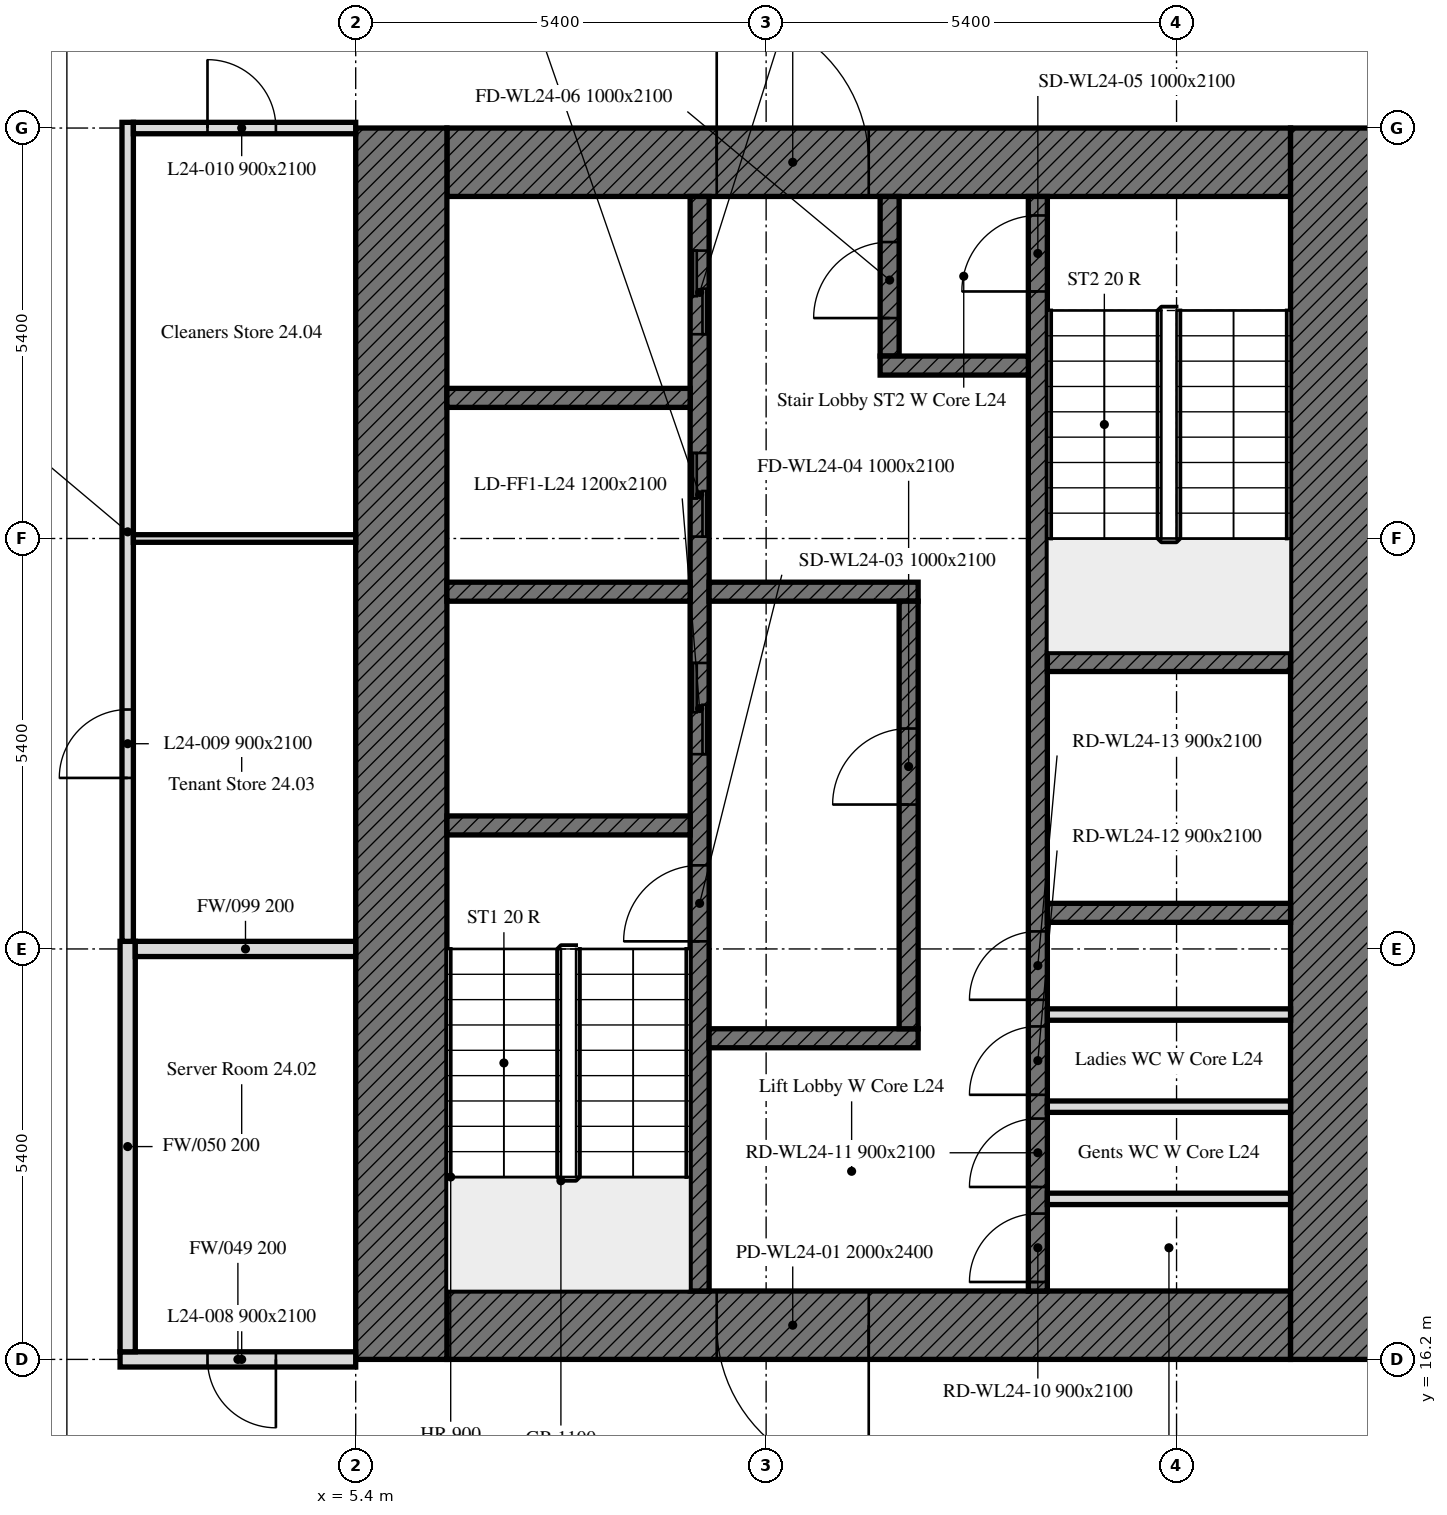
"""IFC4 building model, lengths in metres.
Left out: names, types, materials, properties, quantities, classifications, styles, units other than length and angle.
Written with IfcOpenShell. Run it as: python <this file> out.ifc"""

import sys

from ifc_helpers import new_model, si_unit, direction, frame, frame_2d, origin, place, context, subcontext, project, spatial, rectangle, extrude, element, fill, save


model = new_model("IFC4")
c1 = context("Model", 3, precision=1e-05, world=origin(), true_north=direction((0.0, 1.0)))
c2 = subcontext(c1, "Body", "Model", "MODEL_VIEW")
j1 = project(units=[si_unit("LENGTHUNIT", "METRE"), si_unit("PLANEANGLEUNIT", "RADIAN")], contexts=[c1])
p1 = place(None, origin())
s1 = spatial("IfcSite", under=j1, at=p1, CompositionType="ELEMENT")
p2 = place(p1, origin())
s2 = spatial("IfcBuilding", under=s1, at=p2, CompositionType="ELEMENT")
p3 = place(p2, frame((0.0, 0.0, 103.0)))
s3 = spatial("IfcBuildingStorey", under=s2, at=p3, CompositionType="ELEMENT", Elevation=103.0)
p4 = place(p3, frame((17.7, 16.65, 0.0), z_axis=(0.0, 0.0, 1.0), x_axis=(-1.0, 0.0, 0.0)))
e1 = element("IfcWall", 1, at=p4, inside=s3, PredefinedType="SOLIDWALL", context=c2, shape_type="SweptSolid", body=[
    extrude(rectangle(XDim=11.1, YDim=0.9, at=frame_2d((5.55, 0.0))), origin(), (0.0, 0.0, 1.0), 3.5),
])
p5 = place(p4, frame((5.55, 0.0, 0.0)))
e2 = element("IfcOpeningElement", 2, at=p5, cuts=e1, PredefinedType="OPENING", context=c2, shape_type="SweptSolid", body=[
    extrude(rectangle(XDim=2.0, YDim=2.4, at=frame_2d((1.0, 1.2))), frame((0.0, 0.45, 0.0), z_axis=(0.0, -1.0, 0.0), x_axis=(1.0, 0.0, 0.0)), (0.0, 0.0, 1.0), 0.9),
])
p6 = place(p3, frame((6.6, 31.95, 0.0), z_axis=(0.0, 0.0, 1.0), x_axis=(1.0, 0.0, 0.0)))
e3 = element("IfcWall", 3, at=p6, inside=s3, PredefinedType="SOLIDWALL", context=c2, shape_type="SweptSolid", body=[
    extrude(rectangle(XDim=11.1, YDim=0.9, at=frame_2d((5.55, 0.0))), origin(), (0.0, 0.0, 1.0), 3.5),
])
p7 = place(p6, frame((3.55, 0.0, 0.0)))
e4 = element("IfcOpeningElement", 4, at=p7, cuts=e3, PredefinedType="OPENING", context=c2, shape_type="SweptSolid", body=[
    extrude(rectangle(XDim=2.0, YDim=2.4, at=frame_2d((1.0, 1.2))), frame((0.0, 0.45, 0.0), z_axis=(0.0, -1.0, 0.0), x_axis=(1.0, 0.0, 0.0)), (0.0, 0.0, 1.0), 0.9),
])
for number, where, z_axis, x_axis in (
    (5, (6.0, 16.2, 0.0), (0.0, 0.0, 1.0), (0.0, 1.0, 0.0)),
    (6, (18.3, 32.4, 0.0), (0.0, 0.0, 1.0), (0.0, -1.0, 0.0)),
):
    element("IfcWall", number, at=place(p3, frame(where, z_axis=z_axis, x_axis=x_axis)), inside=s3, PredefinedType="SOLIDWALL", context=c2, shape_type="SweptSolid", body=[
        extrude(rectangle(XDim=16.2, YDim=1.2, at=frame_2d((8.1, 0.0))), origin(), (0.0, 0.0, 1.0), 3.5),
    ])
p8 = place(p3, frame((9.925, 17.1, 0.0), z_axis=(0.0, 0.0, 1.0), x_axis=(0.0, 1.0, 0.0)))
e7 = element("IfcWall", 7, at=p8, inside=s3, PredefinedType="SOLIDWALL", context=c2, shape_type="SweptSolid", body=[
    extrude(rectangle(XDim=14.4, YDim=0.25, at=frame_2d((7.2, 0.0))), origin(), (0.0, 0.0, 1.0), 3.5),
])
p9 = place(p8, frame((4.6, 0.0, 0.0)))
e8 = element("IfcOpeningElement", 8, at=p9, cuts=e7, PredefinedType="OPENING", context=c2, shape_type="SweptSolid", body=[
    extrude(rectangle(XDim=1.0, YDim=2.1, at=frame_2d((0.5, 1.05))), frame((0.0, 0.125, 0.0), z_axis=(0.0, -1.0, 0.0), x_axis=(1.0, 0.0, 0.0)), (0.0, 0.0, 1.0), 0.25),
])
p10 = place(p8, frame((7.062, 0.0, 0.0)))
e9 = element("IfcOpeningElement", 9, at=p10, cuts=e7, PredefinedType="OPENING", context=c2, shape_type="SweptSolid", body=[
    extrude(rectangle(XDim=1.2, YDim=2.1, at=frame_2d((0.6, 1.05))), frame((0.0, 0.125, 0.0), z_axis=(0.0, -1.0, 0.0), x_axis=(1.0, 0.0, 0.0)), (0.0, 0.0, 1.0), 0.25),
])
p11 = place(p8, frame((9.925, 0.0, 0.0)))
e10 = element("IfcOpeningElement", 10, at=p11, cuts=e7, PredefinedType="OPENING", context=c2, shape_type="SweptSolid", body=[
    extrude(rectangle(XDim=1.1, YDim=2.1, at=frame_2d((0.55, 1.05))), frame((0.0, 0.125, 0.0), z_axis=(0.0, -1.0, 0.0), x_axis=(1.0, 0.0, 0.0)), (0.0, 0.0, 1.0), 0.25),
])
p12 = place(p8, frame((12.587, 0.0, 0.0)))
e11 = element("IfcOpeningElement", 11, at=p12, cuts=e7, PredefinedType="OPENING", context=c2, shape_type="SweptSolid", body=[
    extrude(rectangle(XDim=1.1, YDim=2.1, at=frame_2d((0.55, 1.05))), frame((0.0, 0.125, 0.0), z_axis=(0.0, -1.0, 0.0), x_axis=(1.0, 0.0, 0.0)), (0.0, 0.0, 1.0), 0.25),
])
p13 = place(p3, frame((14.375, 17.1, 0.0), z_axis=(0.0, 0.0, 1.0), x_axis=(0.0, 1.0, 0.0)))
e12 = element("IfcWall", 12, at=p13, inside=s3, PredefinedType="SOLIDWALL", context=c2, shape_type="SweptSolid", body=[
    extrude(rectangle(XDim=14.4, YDim=0.25, at=frame_2d((7.2, 0.0))), origin(), (0.0, 0.0, 1.0), 3.5),
])
p14 = place(p13, frame((13.15, 0.0, 0.0)))
e13 = element("IfcOpeningElement", 13, at=p14, cuts=e12, PredefinedType="OPENING", context=c2, shape_type="SweptSolid", body=[
    extrude(rectangle(XDim=1.0, YDim=2.1, at=frame_2d((0.5, 1.05))), frame((0.0, 0.125, 0.0), z_axis=(0.0, -1.0, 0.0), x_axis=(1.0, 0.0, 0.0)), (0.0, 0.0, 1.0), 0.25),
])
p15 = place(p13, frame((0.118, 0.0, 0.0)))
e14 = element("IfcOpeningElement", 14, at=p15, cuts=e12, PredefinedType="OPENING", context=c2, shape_type="SweptSolid", body=[
    extrude(rectangle(XDim=0.9, YDim=2.1, at=frame_2d((0.45, 1.05))), frame((0.0, 0.125, 0.0), z_axis=(0.0, -1.0, 0.0), x_axis=(1.0, 0.0, 0.0)), (0.0, 0.0, 1.0), 0.25),
])
p16 = place(p13, frame((1.368, 0.0, 0.0)))
e15 = element("IfcOpeningElement", 15, at=p16, cuts=e12, PredefinedType="OPENING", context=c2, shape_type="SweptSolid", body=[
    extrude(rectangle(XDim=0.9, YDim=2.1, at=frame_2d((0.45, 1.05))), frame((0.0, 0.125, 0.0), z_axis=(0.0, -1.0, 0.0), x_axis=(1.0, 0.0, 0.0)), (0.0, 0.0, 1.0), 0.25),
])
p17 = place(p13, frame((2.581, 0.0, 0.0)))
e16 = element("IfcOpeningElement", 16, at=p17, cuts=e12, PredefinedType="OPENING", context=c2, shape_type="SweptSolid", body=[
    extrude(rectangle(XDim=0.9, YDim=2.1, at=frame_2d((0.45, 1.05))), frame((0.0, 0.125, 0.0), z_axis=(0.0, -1.0, 0.0), x_axis=(1.0, 0.0, 0.0)), (0.0, 0.0, 1.0), 0.25),
])
p18 = place(p13, frame((3.831, 0.0, 0.0)))
e17 = element("IfcOpeningElement", 17, at=p18, cuts=e12, PredefinedType="OPENING", context=c2, shape_type="SweptSolid", body=[
    extrude(rectangle(XDim=0.9, YDim=2.1, at=frame_2d((0.45, 1.05))), frame((0.0, 0.125, 0.0), z_axis=(0.0, -1.0, 0.0), x_axis=(1.0, 0.0, 0.0)), (0.0, 0.0, 1.0), 0.25),
])
for number, where, z_axis, x_axis in (
    (18, (6.6, 23.225, 0.0), (0.0, 0.0, 1.0), (1.0, 0.0, 0.0)),
    (19, (14.5, 25.375, 0.0), (0.0, 0.0, 1.0), (1.0, 0.0, 0.0)),
    (20, (14.5, 22.075, 0.0), (0.0, 0.0, 1.0), (1.0, 0.0, 0.0)),
    (21, (6.6, 26.3, 0.0), (0.0, 0.0, 1.0), (1.0, 0.0, 0.0)),
):
    element("IfcWall", number, at=place(p3, frame(where, z_axis=z_axis, x_axis=x_axis)), inside=s3, PredefinedType="SOLIDWALL", context=c2, shape_type="SweptSolid", body=[
        extrude(rectangle(XDim=3.2, YDim=0.25, at=frame_2d((1.6, 0.0))), origin(), (0.0, 0.0, 1.0), 3.5),
    ])
for number, where, z_axis, x_axis in (
    (22, (10.05, 26.3, 0.0), (0.0, 0.0, 1.0), (1.0, 0.0, 0.0)),
    (23, (10.05, 20.425, 0.0), (0.0, 0.0, 1.0), (1.0, 0.0, 0.0)),
):
    element("IfcWall", number, at=place(p3, frame(where, z_axis=z_axis, x_axis=x_axis)), inside=s3, PredefinedType="SOLIDWALL", context=c2, shape_type="SweptSolid", body=[
        extrude(rectangle(XDim=2.75, YDim=0.25, at=frame_2d((1.375, 0.0))), origin(), (0.0, 0.0, 1.0), 3.5),
    ])
p19 = place(p3, frame((12.425, 29.4, 0.0), z_axis=(0.0, 0.0, 1.0), x_axis=(0.0, 1.0, 0.0)))
e24 = element("IfcWall", 24, at=p19, inside=s3, PredefinedType="SOLIDWALL", context=c2, shape_type="SweptSolid", body=[
    extrude(rectangle(XDim=2.1, YDim=0.25, at=frame_2d((1.05, 0.0))), origin(), (0.0, 0.0, 1.0), 3.5),
])
p20 = place(p19, frame((0.5, 0.0, 0.0)))
e25 = element("IfcOpeningElement", 25, at=p20, cuts=e24, PredefinedType="OPENING", context=c2, shape_type="SweptSolid", body=[
    extrude(rectangle(XDim=1.0, YDim=2.1, at=frame_2d((0.5, 1.05))), frame((0.0, 0.125, 0.0), z_axis=(0.0, -1.0, 0.0), x_axis=(1.0, 0.0, 0.0)), (0.0, 0.0, 1.0), 0.25),
])
p21 = place(p3, frame((12.3, 29.275, 0.0), z_axis=(0.0, 0.0, 1.0), x_axis=(1.0, 0.0, 0.0)))
e26 = element("IfcWall", 26, at=p21, inside=s3, PredefinedType="SOLIDWALL", context=c2, shape_type="SweptSolid", body=[
    extrude(rectangle(XDim=1.95, YDim=0.25, at=frame_2d((0.975, 0.0))), origin(), (0.0, 0.0, 1.0), 3.5),
])
p22 = place(p3, frame((12.675, 20.55, 0.0), z_axis=(0.0, 0.0, 1.0), x_axis=(0.0, 1.0, 0.0)))
e27 = element("IfcWall", 27, at=p22, inside=s3, PredefinedType="SOLIDWALL", context=c2, shape_type="SweptSolid", body=[
    extrude(rectangle(XDim=5.625, YDim=0.25, at=frame_2d((2.812, 0.0))), origin(), (0.0, 0.0, 1.0), 3.5),
])
p23 = place(p22, frame((2.95, 0.0, 0.0)))
e28 = element("IfcOpeningElement", 28, at=p23, cuts=e27, PredefinedType="OPENING", context=c2, shape_type="SweptSolid", body=[
    extrude(rectangle(XDim=1.0, YDim=2.1, at=frame_2d((0.5, 1.05))), frame((0.0, 0.125, 0.0), z_axis=(0.0, -1.0, 0.0), x_axis=(1.0, 0.0, 0.0)), (0.0, 0.0, 1.0), 0.25),
])
p24 = place(p3, frame((6.6, 28.85, 0.0), z_axis=(0.0, 0.0, 1.0), x_axis=(1.0, 0.0, 0.0)))
e29 = element("IfcWall", 29, at=p24, inside=s3, PredefinedType="SOLIDWALL", context=c2, shape_type="SweptSolid", body=[
    extrude(rectangle(XDim=3.2, YDim=0.25, at=frame_2d((1.6, 0.0))), origin(), (0.0, 0.0, 1.0), 3.5),
])
for number, where, z_axis, x_axis in (
    (30, (14.5, 18.312, 0.0), (0.0, 0.0, 1.0), (1.0, 0.0, 0.0)),
    (31, (14.5, 19.525, 0.0), (0.0, 0.0, 1.0), (1.0, 0.0, 0.0)),
    (32, (14.5, 20.737, 0.0), (0.0, 0.0, 1.0), (1.0, 0.0, 0.0)),
):
    element("IfcWall", number, at=place(p3, frame(where, z_axis=z_axis, x_axis=x_axis)), inside=s3, PredefinedType="PARTITIONING", context=c2, shape_type="SweptSolid", body=[
        extrude(rectangle(XDim=3.2, YDim=0.15, at=frame_2d((1.6, 0.0))), origin(), (0.0, 0.0, 1.0), 3.5),
    ])
p25 = place(p3, frame((5.4, 16.2, 0.0), z_axis=(0.0, 0.0, 1.0), x_axis=(-1.0, 0.0, 0.0)))
e33 = element("IfcWall", 33, at=p25, inside=s3, PredefinedType="PARTITIONING", context=c2, shape_type="SweptSolid", body=[
    extrude(rectangle(XDim=3.1, YDim=0.2, at=frame_2d((1.55, 0.0))), origin(), (0.0, 0.0, 1.0), 2.75),
])
p26 = place(p25, frame((1.05, 0.0, 0.0)))
e34 = element("IfcOpeningElement", 34, at=p26, cuts=e33, PredefinedType="OPENING", context=c2, shape_type="SweptSolid", body=[
    extrude(rectangle(XDim=0.9, YDim=2.1, at=frame_2d((0.45, 1.05))), frame((0.0, 0.1, 0.0), z_axis=(0.0, -1.0, 0.0), x_axis=(1.0, 0.0, 0.0)), (0.0, 0.0, 1.0), 0.2),
])
p27 = place(p3, frame((2.4, 16.3, 0.0), z_axis=(0.0, 0.0, 1.0), x_axis=(0.0, 1.0, 0.0)))
e35 = element("IfcWall", 35, at=p27, inside=s3, PredefinedType="PARTITIONING", context=c2, shape_type="SweptSolid", body=[
    extrude(rectangle(XDim=5.4, YDim=0.2, at=frame_2d((2.7, 0.0))), origin(), (0.0, 0.0, 1.0), 3.5),
])
p28 = place(p3, frame((2.4, 21.7, 0.0), z_axis=(0.0, 0.0, 1.0), x_axis=(0.0, 1.0, 0.0)))
e36 = element("IfcWall", 36, at=p28, inside=s3, PredefinedType="PARTITIONING", context=c2, shape_type="SweptSolid", body=[
    extrude(rectangle(XDim=10.775, YDim=0.15, at=frame_2d((5.388, 0.0))), origin(), (0.0, 0.0, 1.0), 3.5),
])
p29 = place(p28, frame((2.15, 0.0, 0.0)))
e37 = element("IfcOpeningElement", 37, at=p29, cuts=e36, PredefinedType="OPENING", context=c2, shape_type="SweptSolid", body=[
    extrude(rectangle(XDim=0.9, YDim=2.1, at=frame_2d((0.45, 1.05))), frame((0.0, 0.075, 0.0), z_axis=(0.0, -1.0, 0.0), x_axis=(1.0, 0.0, 0.0)), (0.0, 0.0, 1.0), 0.15),
])
p30 = place(p3, frame((2.475, 32.4, 0.0), z_axis=(0.0, 0.0, 1.0), x_axis=(1.0, 0.0, 0.0)))
e38 = element("IfcWall", 38, at=p30, inside=s3, PredefinedType="PARTITIONING", context=c2, shape_type="SweptSolid", body=[
    extrude(rectangle(XDim=2.925, YDim=0.15, at=frame_2d((1.462, 0.0))), origin(), (0.0, 0.0, 1.0), 2.75),
])
p31 = place(p30, frame((0.975, 0.0, 0.0)))
e39 = element("IfcOpeningElement", 39, at=p31, cuts=e38, PredefinedType="OPENING", context=c2, shape_type="SweptSolid", body=[
    extrude(rectangle(XDim=0.9, YDim=2.1, at=frame_2d((0.45, 1.05))), frame((0.0, 0.075, 0.0), z_axis=(0.0, -1.0, 0.0), x_axis=(1.0, 0.0, 0.0)), (0.0, 0.0, 1.0), 0.15),
])
p32 = place(p3, frame((5.4, 21.6, 0.0), z_axis=(0.0, 0.0, 1.0), x_axis=(-1.0, 0.0, 0.0)))
e40 = element("IfcWall", 40, at=p32, inside=s3, PredefinedType="PARTITIONING", context=c2, shape_type="SweptSolid", body=[
    extrude(rectangle(XDim=2.9, YDim=0.2, at=frame_2d((1.45, 0.0))), origin(), (0.0, 0.0, 1.0), 2.75),
])
p33 = place(p3, frame((5.4, 27.0, 0.0), z_axis=(0.0, 0.0, 1.0), x_axis=(-1.0, 0.0, 0.0)))
e41 = element("IfcWall", 41, at=p33, inside=s3, PredefinedType="PARTITIONING", context=c2, shape_type="SweptSolid", body=[
    extrude(rectangle(XDim=2.925, YDim=0.1, at=frame_2d((1.462, 0.0))), origin(), (0.0, 0.0, 1.0), 2.75),
])
p34 = place(p5, origin())
e42 = element("IfcDoor", 42, at=p34, inside=s3, OperationType="DOUBLE_DOOR_SINGLE_SWING", PredefinedType="DOOR", context=c2, shape_type="SweptSolid", body=[
    extrude(rectangle(XDim=2.0, YDim=2.4, at=frame_2d((1.0, 1.2))), frame((0.0, 0.025, 0.0), z_axis=(0.0, -1.0, 0.0), x_axis=(1.0, 0.0, 0.0)), (0.0, 0.0, 1.0), 0.05),
])
fill(e2, e42)
p35 = place(p7, origin())
e43 = element("IfcDoor", 43, at=p35, inside=s3, OperationType="DOUBLE_DOOR_SINGLE_SWING", PredefinedType="DOOR", context=c2, shape_type="SweptSolid", body=[
    extrude(rectangle(XDim=2.0, YDim=2.4, at=frame_2d((1.0, 1.2))), frame((0.0, 0.025, 0.0), z_axis=(0.0, -1.0, 0.0), x_axis=(1.0, 0.0, 0.0)), (0.0, 0.0, 1.0), 0.05),
])
fill(e4, e43)
p36 = place(p9, origin())
e44 = element("IfcDoor", 44, at=p36, inside=s3, OperationType="SINGLE_SWING_LEFT", PredefinedType="DOOR", context=c2, shape_type="SweptSolid", body=[
    extrude(rectangle(XDim=1.0, YDim=2.1, at=frame_2d((0.5, 1.05))), frame((0.0, 0.025, 0.0), z_axis=(0.0, -1.0, 0.0), x_axis=(1.0, 0.0, 0.0)), (0.0, 0.0, 1.0), 0.05),
])
fill(e8, e44)
p37 = place(p23, origin())
e45 = element("IfcDoor", 45, at=p37, inside=s3, OperationType="SINGLE_SWING_LEFT", PredefinedType="DOOR", context=c2, shape_type="SweptSolid", body=[
    extrude(rectangle(XDim=1.0, YDim=2.1, at=frame_2d((0.5, 1.05))), frame((0.0, 0.025, 0.0), z_axis=(0.0, -1.0, 0.0), x_axis=(1.0, 0.0, 0.0)), (0.0, 0.0, 1.0), 0.05),
])
fill(e28, e45)
p38 = place(p14, origin())
e46 = element("IfcDoor", 46, at=p38, inside=s3, OperationType="SINGLE_SWING_LEFT", PredefinedType="DOOR", context=c2, shape_type="SweptSolid", body=[
    extrude(rectangle(XDim=1.0, YDim=2.1, at=frame_2d((0.5, 1.05))), frame((0.0, 0.025, 0.0), z_axis=(0.0, -1.0, 0.0), x_axis=(1.0, 0.0, 0.0)), (0.0, 0.0, 1.0), 0.05),
])
fill(e13, e46)
p39 = place(p20, origin())
e47 = element("IfcDoor", 47, at=p39, inside=s3, OperationType="SINGLE_SWING_LEFT", PredefinedType="DOOR", context=c2, shape_type="SweptSolid", body=[
    extrude(rectangle(XDim=1.0, YDim=2.1, at=frame_2d((0.5, 1.05))), frame((0.0, 0.025, 0.0), z_axis=(0.0, -1.0, 0.0), x_axis=(1.0, 0.0, 0.0)), (0.0, 0.0, 1.0), 0.05),
])
fill(e25, e47)
p40 = place(p10, origin())
e48 = element("IfcDoor", 48, at=p40, inside=s3, OperationType="DOUBLE_DOOR_SLIDING", PredefinedType="DOOR", context=c2, shape_type="SweptSolid", body=[
    extrude(rectangle(XDim=1.2, YDim=2.1, at=frame_2d((0.6, 1.05))), frame((0.0, 0.025, 0.0), z_axis=(0.0, -1.0, 0.0), x_axis=(1.0, 0.0, 0.0)), (0.0, 0.0, 1.0), 0.05),
])
fill(e9, e48)
p41 = place(p11, origin())
e49 = element("IfcDoor", 49, at=p41, inside=s3, OperationType="DOUBLE_DOOR_SLIDING", PredefinedType="DOOR", context=c2, shape_type="SweptSolid", body=[
    extrude(rectangle(XDim=1.1, YDim=2.1, at=frame_2d((0.55, 1.05))), frame((0.0, 0.025, 0.0), z_axis=(0.0, -1.0, 0.0), x_axis=(1.0, 0.0, 0.0)), (0.0, 0.0, 1.0), 0.05),
])
fill(e10, e49)
p42 = place(p12, origin())
e50 = element("IfcDoor", 50, at=p42, inside=s3, OperationType="DOUBLE_DOOR_SLIDING", PredefinedType="DOOR", context=c2, shape_type="SweptSolid", body=[
    extrude(rectangle(XDim=1.1, YDim=2.1, at=frame_2d((0.55, 1.05))), frame((0.0, 0.025, 0.0), z_axis=(0.0, -1.0, 0.0), x_axis=(1.0, 0.0, 0.0)), (0.0, 0.0, 1.0), 0.05),
])
fill(e11, e50)
p43 = place(p15, origin())
e51 = element("IfcDoor", 51, at=p43, inside=s3, OperationType="SINGLE_SWING_LEFT", PredefinedType="DOOR", context=c2, shape_type="SweptSolid", body=[
    extrude(rectangle(XDim=0.9, YDim=2.1, at=frame_2d((0.45, 1.05))), frame((0.0, 0.025, 0.0), z_axis=(0.0, -1.0, 0.0), x_axis=(1.0, 0.0, 0.0)), (0.0, 0.0, 1.0), 0.05),
])
fill(e14, e51)
p44 = place(p16, origin())
e52 = element("IfcDoor", 52, at=p44, inside=s3, OperationType="SINGLE_SWING_LEFT", PredefinedType="DOOR", context=c2, shape_type="SweptSolid", body=[
    extrude(rectangle(XDim=0.9, YDim=2.1, at=frame_2d((0.45, 1.05))), frame((0.0, 0.025, 0.0), z_axis=(0.0, -1.0, 0.0), x_axis=(1.0, 0.0, 0.0)), (0.0, 0.0, 1.0), 0.05),
])
fill(e15, e52)
p45 = place(p17, origin())
e53 = element("IfcDoor", 53, at=p45, inside=s3, OperationType="SINGLE_SWING_LEFT", PredefinedType="DOOR", context=c2, shape_type="SweptSolid", body=[
    extrude(rectangle(XDim=0.9, YDim=2.1, at=frame_2d((0.45, 1.05))), frame((0.0, 0.025, 0.0), z_axis=(0.0, -1.0, 0.0), x_axis=(1.0, 0.0, 0.0)), (0.0, 0.0, 1.0), 0.05),
])
fill(e16, e53)
p46 = place(p18, origin())
e54 = element("IfcDoor", 54, at=p46, inside=s3, OperationType="SINGLE_SWING_LEFT", PredefinedType="DOOR", context=c2, shape_type="SweptSolid", body=[
    extrude(rectangle(XDim=0.9, YDim=2.1, at=frame_2d((0.45, 1.05))), frame((0.0, 0.025, 0.0), z_axis=(0.0, -1.0, 0.0), x_axis=(1.0, 0.0, 0.0)), (0.0, 0.0, 1.0), 0.05),
])
fill(e17, e54)
p47 = place(p26, origin())
e55 = element("IfcDoor", 55, at=p47, inside=s3, OperationType="SINGLE_SWING_RIGHT", PredefinedType="DOOR", context=c2, shape_type="SweptSolid", body=[
    extrude(rectangle(XDim=0.9, YDim=2.1, at=frame_2d((0.45, 1.05))), frame((0.0, 0.025, 0.0), z_axis=(0.0, -1.0, 0.0), x_axis=(1.0, 0.0, 0.0)), (0.0, 0.0, 1.0), 0.05),
])
fill(e34, e55)
p48 = place(p29, origin())
e56 = element("IfcDoor", 56, at=p48, inside=s3, OperationType="SINGLE_SWING_RIGHT", PredefinedType="DOOR", context=c2, shape_type="SweptSolid", body=[
    extrude(rectangle(XDim=0.9, YDim=2.1, at=frame_2d((0.45, 1.05))), frame((0.0, 0.025, 0.0), z_axis=(0.0, -1.0, 0.0), x_axis=(1.0, 0.0, 0.0)), (0.0, 0.0, 1.0), 0.05),
])
fill(e37, e56)
p49 = place(p31, origin())
e57 = element("IfcDoor", 57, at=p49, inside=s3, OperationType="SINGLE_SWING_RIGHT", PredefinedType="DOOR", context=c2, shape_type="SweptSolid", body=[
    extrude(rectangle(XDim=0.9, YDim=2.1, at=frame_2d((0.45, 1.05))), frame((0.0, 0.025, 0.0), z_axis=(0.0, -1.0, 0.0), x_axis=(1.0, 0.0, 0.0)), (0.0, 0.0, 1.0), 0.05),
])
fill(e39, e57)
save(model, sys.argv[1])
